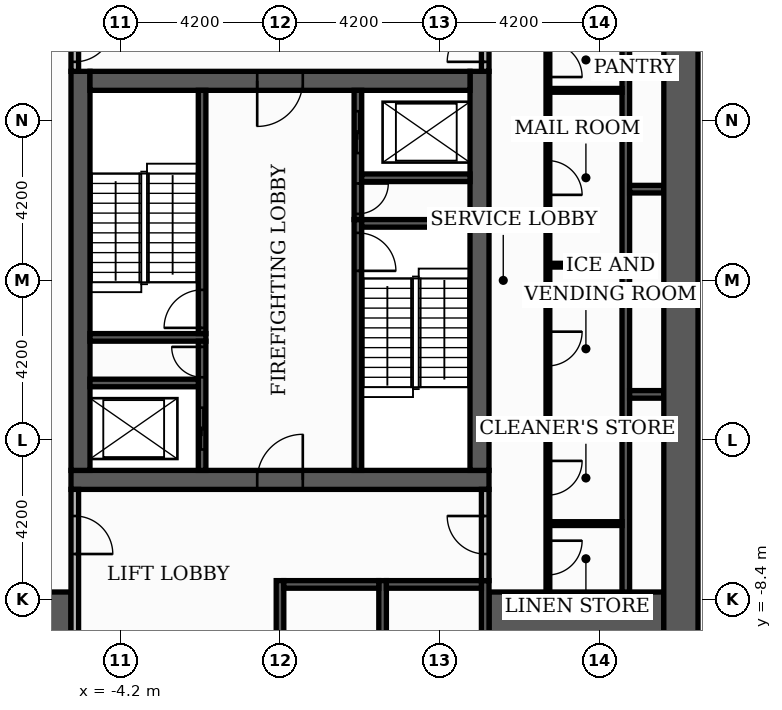
"""IFC4 building model, lengths in metres.
Left out: names, types, materials, properties, quantities, classifications, styles, units other than length and angle.
Written with IfcOpenShell. Run it as: python <this file> out.ifc"""

import sys

from ifc_helpers import new_model, si_unit, direction, frame, frame_2d, origin, place, context, subcontext, project, spatial, rectangle, extrude, element, fill, save


model = new_model("IFC4")
c1 = context("Model", 3, precision=1e-05, world=origin(), true_north=direction((0.0, 1.0)))
c2 = subcontext(c1, "Body", "Model", "MODEL_VIEW")
j1 = project(units=[si_unit("LENGTHUNIT", "METRE"), si_unit("PLANEANGLEUNIT", "RADIAN")], contexts=[c1])
p1 = place(None, origin())
s1 = spatial("IfcSite", under=j1, at=p1, CompositionType="ELEMENT")
p2 = place(p1, origin())
s2 = spatial("IfcBuilding", under=s1, at=p2, CompositionType="ELEMENT")
p3 = place(p2, frame((0.0, 0.0, -4.2)))
s3 = spatial("IfcBuildingStorey", under=s2, at=p3, CompositionType="ELEMENT", Elevation=-4.2)
p4 = place(p3, frame((-5.5, -5.25, 0.0), z_axis=(0.0, 0.0, 1.0), x_axis=(1.0, 0.0, 0.0)))
e1 = element("IfcWall", 1, at=p4, inside=s3, PredefinedType="SHEAR", context=c2, shape_type="SweptSolid", body=[
    extrude(rectangle(XDim=11.0, YDim=0.5, at=frame_2d((5.5, 0.0))), origin(), (0.0, 0.0, 1.0), 3.78),
])
p5 = place(p4, frame((4.9, 0.0, 0.0)))
e2 = element("IfcOpeningElement", 2, at=p5, cuts=e1, PredefinedType="OPENING", context=c2, shape_type="SweptSolid", body=[
    extrude(rectangle(XDim=1.2, YDim=2.1, at=frame_2d((0.6, 1.05))), frame((0.0, 0.26, 0.0), z_axis=(0.0, -1.0, 0.0), x_axis=(1.0, 0.0, 0.0)), (0.0, 0.0, 1.0), 0.52),
])
for number, where, z_axis, x_axis in (
    (3, (-5.25, -5.0, 0.0), (0.0, 0.0, 1.0), (0.0, 1.0, 0.0)),
    (4, (5.25, -5.0, 0.0), (0.0, 0.0, 1.0), (0.0, 1.0, 0.0)),
):
    element("IfcWall", number, at=place(p3, frame(where, z_axis=z_axis, x_axis=x_axis)), inside=s3, PredefinedType="SHEAR", context=c2, shape_type="SweptSolid", body=[
        extrude(rectangle(XDim=10.5, YDim=0.5, at=frame_2d((5.25, 0.0))), origin(), (0.0, 0.0, 1.0), 3.78),
    ])
p6 = place(p3, frame((-5.0, 5.25, 0.0), z_axis=(0.0, 0.0, 1.0), x_axis=(1.0, 0.0, 0.0)))
e5 = element("IfcWall", 5, at=p6, inside=s3, PredefinedType="SHEAR", context=c2, shape_type="SweptSolid", body=[
    extrude(rectangle(XDim=10.0, YDim=0.5, at=frame_2d((5.0, 0.0))), origin(), (0.0, 0.0, 1.0), 3.78),
])
p7 = place(p6, frame((4.4, 0.0, 0.0)))
e6 = element("IfcOpeningElement", 6, at=p7, cuts=e5, PredefinedType="OPENING", context=c2, shape_type="SweptSolid", body=[
    extrude(rectangle(XDim=1.2, YDim=2.1, at=frame_2d((0.6, 1.05))), frame((0.0, 0.26, 0.0), z_axis=(0.0, -1.0, 0.0), x_axis=(1.0, 0.0, 0.0)), (0.0, 0.0, 1.0), 0.52),
])
for number, where, z_axis, x_axis in (
    (7, (-10.1, -9.15, 0.0), (0.0, 0.0, 1.0), (1.0, 0.0, 0.0)),
    (8, (5.5, -9.15, 0.0), (0.0, 0.0, 1.0), (1.0, 0.0, 0.0)),
):
    element("IfcWall", number, at=place(p3, frame(where, z_axis=z_axis, x_axis=x_axis)), inside=s3, PredefinedType="SHEAR", context=c2, shape_type="SweptSolid", body=[
        extrude(rectangle(XDim=4.6, YDim=1.9, at=frame_2d((2.3, 0.0))), origin(), (0.0, 0.0, 1.0), 3.78),
    ])
p8 = place(p3, frame((2.05, -5.0, 0.0), z_axis=(0.0, 0.0, 1.0), x_axis=(0.0, 1.0, 0.0)))
e9 = element("IfcWall", 9, at=p8, inside=s3, PredefinedType="SHEAR", context=c2, shape_type="SweptSolid", body=[
    extrude(rectangle(XDim=6.6, YDim=0.2, at=frame_2d((3.3, 0.0))), origin(), (0.0, 0.0, 1.0), 3.78),
])
p9 = place(p8, frame((5.25, 0.0, 0.0)))
e10 = element("IfcOpeningElement", 10, at=p9, cuts=e9, PredefinedType="OPENING", context=c2, shape_type="SweptSolid", body=[
    extrude(rectangle(XDim=1.0, YDim=2.1, at=frame_2d((0.5, 1.05))), frame((0.0, 0.11, 0.0), z_axis=(0.0, -1.0, 0.0), x_axis=(1.0, 0.0, 0.0)), (0.0, 0.0, 1.0), 0.22),
])
p10 = place(p3, frame((-5.0, -1.5, 0.0), z_axis=(0.0, 0.0, 1.0), x_axis=(1.0, 0.0, 0.0)))
e11 = element("IfcWall", 11, at=p10, inside=s3, PredefinedType="SHEAR", context=c2, shape_type="SweptSolid", body=[
    extrude(rectangle(XDim=3.05, YDim=0.2, at=frame_2d((1.525, 0.0))), origin(), (0.0, 0.0, 1.0), 3.78),
])
p11 = place(p3, frame((-2.05, -1.4, 0.0), z_axis=(0.0, 0.0, 1.0), x_axis=(0.0, 1.0, 0.0)))
e12 = element("IfcWall", 12, at=p11, inside=s3, PredefinedType="SHEAR", context=c2, shape_type="SweptSolid", body=[
    extrude(rectangle(XDim=6.4, YDim=0.2, at=frame_2d((3.2, 0.0))), origin(), (0.0, 0.0, 1.0), 3.78),
])
p12 = place(p11, frame((0.15, 0.0, 0.0)))
e13 = element("IfcOpeningElement", 13, at=p12, cuts=e12, PredefinedType="OPENING", context=c2, shape_type="SweptSolid", body=[
    extrude(rectangle(XDim=1.0, YDim=2.1, at=frame_2d((0.5, 1.05))), frame((0.0, 0.11, 0.0), z_axis=(0.0, -1.0, 0.0), x_axis=(1.0, 0.0, 0.0)), (0.0, 0.0, 1.0), 0.22),
])
p13 = place(p3, frame((2.15, 1.5, 0.0), z_axis=(0.0, 0.0, 1.0), x_axis=(1.0, 0.0, 0.0)))
e14 = element("IfcWall", 14, at=p13, inside=s3, PredefinedType="SHEAR", context=c2, shape_type="SweptSolid", body=[
    extrude(rectangle(XDim=2.85, YDim=0.2, at=frame_2d((1.425, 0.0))), origin(), (0.0, 0.0, 1.0), 3.78),
])
for number, where, z_axis, x_axis in (
    (15, (0.0, -10.1, 0.0), (0.0, 0.0, 1.0), (0.0, 1.0, 0.0)),
    (16, (2.7, -10.1, 0.0), (0.0, 0.0, 1.0), (0.0, 1.0, 0.0)),
    (17, (5.4, -10.1, 0.0), (0.0, 0.0, 1.0), (0.0, 1.0, 0.0)),
):
    element("IfcWall", number, at=place(p3, frame(where, z_axis=z_axis, x_axis=x_axis)), inside=s3, PredefinedType="SHEAR", context=c2, shape_type="SweptSolid", body=[
        extrude(rectangle(XDim=2.2, YDim=0.2, at=frame_2d((1.1, 0.0))), origin(), (0.0, 0.0, 1.0), 3.78),
    ])
p14 = place(p3, frame((9.1, -8.2, 0.0), z_axis=(0.0, 0.0, 1.0), x_axis=(0.0, 1.0, 0.0)))
e18 = element("IfcWall", 18, at=p14, inside=s3, PredefinedType="SHEAR", context=c2, shape_type="SweptSolid", body=[
    extrude(rectangle(XDim=16.4, YDim=0.2, at=frame_2d((8.2, 0.0))), origin(), (0.0, 0.0, 1.0), 3.78),
])
for number, where, z_axis, x_axis in (
    (19, (0.1, -8.0, 0.0), (0.0, 0.0, 1.0), (1.0, 0.0, 0.0)),
    (20, (2.8, -8.0, 0.0), (0.0, 0.0, 1.0), (1.0, 0.0, 0.0)),
):
    element("IfcWall", number, at=place(p3, frame(where, z_axis=z_axis, x_axis=x_axis)), inside=s3, PredefinedType="SHEAR", context=c2, shape_type="SweptSolid", body=[
        extrude(rectangle(XDim=2.5, YDim=0.2, at=frame_2d((1.25, 0.0))), origin(), (0.0, 0.0, 1.0), 3.78),
    ])
p15 = place(p3, frame((-2.05, -5.0, 0.0), z_axis=(0.0, 0.0, 1.0), x_axis=(0.0, 1.0, 0.0)))
e21 = element("IfcWall", 21, at=p15, inside=s3, PredefinedType="SHEAR", context=c2, shape_type="SweptSolid", body=[
    extrude(rectangle(XDim=3.4, YDim=0.2, at=frame_2d((1.7, 0.0))), origin(), (0.0, 0.0, 1.0), 3.78),
])
p16 = place(p15, frame((0.55, 0.0, 0.0)))
e22 = element("IfcOpeningElement", 22, at=p16, cuts=e21, PredefinedType="OPENING", context=c2, shape_type="SweptSolid", body=[
    extrude(rectangle(XDim=1.1, YDim=2.1, at=frame_2d((0.55, 1.05))), frame((0.0, 0.11, 0.0), z_axis=(0.0, -1.0, 0.0), x_axis=(1.0, 0.0, 0.0)), (0.0, 0.0, 1.0), 0.22),
])
p17 = place(p15, frame((2.45, 0.0, 0.0)))
e23 = element("IfcOpeningElement", 23, at=p17, cuts=e21, PredefinedType="OPENING", context=c2, shape_type="SweptSolid", body=[
    extrude(rectangle(XDim=0.8, YDim=2.1, at=frame_2d((0.4, 1.05))), frame((0.0, 0.11, 0.0), z_axis=(0.0, -1.0, 0.0), x_axis=(1.0, 0.0, 0.0)), (0.0, 0.0, 1.0), 0.22),
])
p18 = place(p3, frame((9.2, -3.0, 0.0), z_axis=(0.0, 0.0, 1.0), x_axis=(1.0, 0.0, 0.0)))
e24 = element("IfcWall", 24, at=p18, inside=s3, PredefinedType="SHEAR", context=c2, shape_type="SweptSolid", body=[
    extrude(rectangle(XDim=0.9, YDim=0.2, at=frame_2d((0.45, 0.0))), origin(), (0.0, 0.0, 1.0), 3.78),
])
p19 = place(p3, frame((-5.0, -2.7, 0.0), z_axis=(0.0, 0.0, 1.0), x_axis=(1.0, 0.0, 0.0)))
e25 = element("IfcWall", 25, at=p19, inside=s3, PredefinedType="SHEAR", context=c2, shape_type="SweptSolid", body=[
    extrude(rectangle(XDim=2.85, YDim=0.2, at=frame_2d((1.425, 0.0))), origin(), (0.0, 0.0, 1.0), 3.78),
])
p20 = place(p3, frame((2.05, 1.6, 0.0), z_axis=(0.0, 0.0, 1.0), x_axis=(0.0, 1.0, 0.0)))
e26 = element("IfcWall", 26, at=p20, inside=s3, PredefinedType="SHEAR", context=c2, shape_type="SweptSolid", body=[
    extrude(rectangle(XDim=3.4, YDim=0.2, at=frame_2d((1.7, 0.0))), origin(), (0.0, 0.0, 1.0), 3.78),
])
p21 = place(p20, frame((1.75, 0.0, 0.0)))
e27 = element("IfcOpeningElement", 27, at=p21, cuts=e26, PredefinedType="OPENING", context=c2, shape_type="SweptSolid", body=[
    extrude(rectangle(XDim=1.1, YDim=2.1, at=frame_2d((0.55, 1.05))), frame((0.0, 0.11, 0.0), z_axis=(0.0, -1.0, 0.0), x_axis=(1.0, 0.0, 0.0)), (0.0, 0.0, 1.0), 0.22),
])
p22 = place(p20, frame((0.15, 0.0, 0.0)))
e28 = element("IfcOpeningElement", 28, at=p22, cuts=e26, PredefinedType="OPENING", context=c2, shape_type="SweptSolid", body=[
    extrude(rectangle(XDim=0.8, YDim=2.1, at=frame_2d((0.4, 1.05))), frame((0.0, 0.11, 0.0), z_axis=(0.0, -1.0, 0.0), x_axis=(1.0, 0.0, 0.0)), (0.0, 0.0, 1.0), 0.22),
])
p23 = place(p3, frame((9.2, 2.4, 0.0), z_axis=(0.0, 0.0, 1.0), x_axis=(1.0, 0.0, 0.0)))
e29 = element("IfcWall", 29, at=p23, inside=s3, PredefinedType="SHEAR", context=c2, shape_type="SweptSolid", body=[
    extrude(rectangle(XDim=0.9, YDim=0.2, at=frame_2d((0.45, 0.0))), origin(), (0.0, 0.0, 1.0), 3.78),
])
p24 = place(p3, frame((2.15, 2.7, 0.0), z_axis=(0.0, 0.0, 1.0), x_axis=(1.0, 0.0, 0.0)))
e30 = element("IfcWall", 30, at=p24, inside=s3, PredefinedType="SHEAR", context=c2, shape_type="SweptSolid", body=[
    extrude(rectangle(XDim=2.85, YDim=0.2, at=frame_2d((1.425, 0.0))), origin(), (0.0, 0.0, 1.0), 3.78),
])
p25 = place(p3, frame((10.55, -10.1, 0.0), z_axis=(0.0, 0.0, 1.0), x_axis=(0.0, 1.0, 0.0)))
e31 = element("IfcWall", 31, at=p25, inside=s3, PredefinedType="SHEAR", context=c2, shape_type="SweptSolid", body=[
    extrude(rectangle(XDim=20.2, YDim=0.9, at=frame_2d((10.1, 0.0))), origin(), (0.0, 0.0, 1.0), 3.78),
])
p26 = place(p3, frame((-5.4, -10.1, 0.0), z_axis=(0.0, 0.0, 1.0), x_axis=(0.0, 1.0, 0.0)))
e32 = element("IfcWall", 32, at=p26, inside=s3, PredefinedType="PARTITIONING", context=c2, shape_type="SweptSolid", body=[
    extrude(rectangle(XDim=4.6, YDim=0.2, at=frame_2d((2.3, 0.0))), origin(), (0.0, 0.0, 1.0), 3.78),
])
p27 = place(p26, frame((2.9, 0.0, 0.0)))
e33 = element("IfcOpeningElement", 33, at=p27, cuts=e32, PredefinedType="OPENING", context=c2, shape_type="SweptSolid", body=[
    extrude(rectangle(XDim=1.0, YDim=2.1, at=frame_2d((0.5, 1.05))), frame((0.0, 0.11, 0.0), z_axis=(0.0, -1.0, 0.0), x_axis=(1.0, 0.0, 0.0)), (0.0, 0.0, 1.0), 0.22),
])
p28 = place(p3, frame((7.05, -8.2, 0.0), z_axis=(0.0, 0.0, 1.0), x_axis=(0.0, 1.0, 0.0)))
e34 = element("IfcWall", 34, at=p28, inside=s3, PredefinedType="PARTITIONING", context=c2, shape_type="SweptSolid", body=[
    extrude(rectangle(XDim=16.4, YDim=0.1, at=frame_2d((8.2, 0.0))), origin(), (0.0, 0.0, 1.0), 3.78),
])
p29 = place(p28, frame((0.45, 0.0, 0.0)))
e35 = element("IfcOpeningElement", 35, at=p29, cuts=e34, PredefinedType="OPENING", context=c2, shape_type="SweptSolid", body=[
    extrude(rectangle(XDim=0.9, YDim=2.1, at=frame_2d((0.45, 1.05))), frame((0.0, 0.06, 0.0), z_axis=(0.0, -1.0, 0.0), x_axis=(1.0, 0.0, 0.0)), (0.0, 0.0, 1.0), 0.12),
])
p30 = place(p28, frame((2.55, 0.0, 0.0)))
e36 = element("IfcOpeningElement", 36, at=p30, cuts=e34, PredefinedType="OPENING", context=c2, shape_type="SweptSolid", body=[
    extrude(rectangle(XDim=0.9, YDim=2.1, at=frame_2d((0.45, 1.05))), frame((0.0, 0.06, 0.0), z_axis=(0.0, -1.0, 0.0), x_axis=(1.0, 0.0, 0.0)), (0.0, 0.0, 1.0), 0.12),
])
p31 = place(p28, frame((5.95, 0.0, 0.0)))
e37 = element("IfcOpeningElement", 37, at=p31, cuts=e34, PredefinedType="OPENING", context=c2, shape_type="SweptSolid", body=[
    extrude(rectangle(XDim=0.9, YDim=2.1, at=frame_2d((0.45, 1.05))), frame((0.0, 0.06, 0.0), z_axis=(0.0, -1.0, 0.0), x_axis=(1.0, 0.0, 0.0)), (0.0, 0.0, 1.0), 0.12),
])
p32 = place(p28, frame((10.45, 0.0, 0.0)))
e38 = element("IfcOpeningElement", 38, at=p32, cuts=e34, PredefinedType="OPENING", context=c2, shape_type="SweptSolid", body=[
    extrude(rectangle(XDim=0.9, YDim=2.1, at=frame_2d((0.45, 1.05))), frame((0.0, 0.06, 0.0), z_axis=(0.0, -1.0, 0.0), x_axis=(1.0, 0.0, 0.0)), (0.0, 0.0, 1.0), 0.12),
])
p33 = place(p28, frame((13.55, 0.0, 0.0)))
e39 = element("IfcOpeningElement", 39, at=p33, cuts=e34, PredefinedType="OPENING", context=c2, shape_type="SweptSolid", body=[
    extrude(rectangle(XDim=0.9, YDim=2.1, at=frame_2d((0.45, 1.05))), frame((0.0, 0.06, 0.0), z_axis=(0.0, -1.0, 0.0), x_axis=(1.0, 0.0, 0.0)), (0.0, 0.0, 1.0), 0.12),
])
p34 = place(p28, frame((15.1, 0.0, 0.0)))
e40 = element("IfcOpeningElement", 40, at=p34, cuts=e34, PredefinedType="OPENING", context=c2, shape_type="SweptSolid", body=[
    extrude(rectangle(XDim=1.0, YDim=2.1, at=frame_2d((0.5, 1.05))), frame((0.0, 0.06, 0.0), z_axis=(0.0, -1.0, 0.0), x_axis=(1.0, 0.0, 0.0)), (0.0, 0.0, 1.0), 0.12),
])
p35 = place(p3, frame((5.4, -7.9, 0.0), z_axis=(0.0, 0.0, 1.0), x_axis=(0.0, 1.0, 0.0)))
e41 = element("IfcWall", 41, at=p35, inside=s3, PredefinedType="PARTITIONING", context=c2, shape_type="SweptSolid", body=[
    extrude(rectangle(XDim=2.4, YDim=0.2, at=frame_2d((1.2, 0.0))), origin(), (0.0, 0.0, 1.0), 3.78),
])
p36 = place(p35, frame((0.7, 0.0, 0.0)))
e42 = element("IfcOpeningElement", 42, at=p36, cuts=e41, PredefinedType="OPENING", context=c2, shape_type="SweptSolid", body=[
    extrude(rectangle(XDim=1.0, YDim=2.1, at=frame_2d((0.5, 1.05))), frame((0.0, 0.11, 0.0), z_axis=(0.0, -1.0, 0.0), x_axis=(1.0, 0.0, 0.0)), (0.0, 0.0, 1.0), 0.22),
])
for number, where, z_axis, x_axis in (
    (43, (7.1, -6.4, 0.0), (0.0, 0.0, 1.0), (1.0, 0.0, 0.0)),
    (44, (7.1, -4.0, 0.0), (0.0, 0.0, 1.0), (1.0, 0.0, 0.0)),
    (45, (7.1, 0.4, 0.0), (0.0, 0.0, 1.0), (1.0, 0.0, 0.0)),
    (46, (7.1, 5.0, 0.0), (0.0, 0.0, 1.0), (1.0, 0.0, 0.0)),
):
    element("IfcWall", number, at=place(p3, frame(where, z_axis=z_axis, x_axis=x_axis)), inside=s3, PredefinedType="PARTITIONING", context=c2, shape_type="SweptSolid", body=[
        extrude(rectangle(XDim=1.9, YDim=0.1, at=frame_2d((0.95, 0.0))), origin(), (0.0, 0.0, 1.0), 3.78),
    ])
p37 = place(p3, frame((-5.4, 5.5, 0.0), z_axis=(0.0, 0.0, 1.0), x_axis=(0.0, 1.0, 0.0)))
e47 = element("IfcWall", 47, at=p37, inside=s3, PredefinedType="PARTITIONING", context=c2, shape_type="SweptSolid", body=[
    extrude(rectangle(XDim=1.55, YDim=0.2, at=frame_2d((0.775, 0.0))), origin(), (0.0, 0.0, 1.0), 3.78),
])
p38 = place(p37, frame((0.25, 0.0, 0.0)))
e48 = element("IfcOpeningElement", 48, at=p38, cuts=e47, PredefinedType="OPENING", context=c2, shape_type="SweptSolid", body=[
    extrude(rectangle(XDim=1.0, YDim=2.1, at=frame_2d((0.5, 1.05))), frame((0.0, 0.11, 0.0), z_axis=(0.0, -1.0, 0.0), x_axis=(1.0, 0.0, 0.0)), (0.0, 0.0, 1.0), 0.22),
])
p39 = place(p3, frame((5.4, 5.5, 0.0), z_axis=(0.0, 0.0, 1.0), x_axis=(0.0, 1.0, 0.0)))
e49 = element("IfcWall", 49, at=p39, inside=s3, PredefinedType="PARTITIONING", context=c2, shape_type="SweptSolid", body=[
    extrude(rectangle(XDim=4.6, YDim=0.2, at=frame_2d((2.3, 0.0))), origin(), (0.0, 0.0, 1.0), 3.78),
])
p40 = place(p39, frame((0.25, 0.0, 0.0)))
e50 = element("IfcOpeningElement", 50, at=p40, cuts=e49, PredefinedType="OPENING", context=c2, shape_type="SweptSolid", body=[
    extrude(rectangle(XDim=1.0, YDim=2.1, at=frame_2d((0.5, 1.05))), frame((0.0, 0.11, 0.0), z_axis=(0.0, -1.0, 0.0), x_axis=(1.0, 0.0, 0.0)), (0.0, 0.0, 1.0), 0.22),
])
p41 = place(p21, origin())
e51 = element("IfcDoor", 51, at=p41, inside=s3, OperationType="SLIDING_TO_LEFT", PredefinedType="DOOR", context=c2, shape_type="SweptSolid", body=[
    extrude(rectangle(XDim=1.1, YDim=2.1, at=frame_2d((0.55, 1.05))), frame((0.0, 0.025, 0.0), z_axis=(0.0, -1.0, 0.0), x_axis=(1.0, 0.0, 0.0)), (0.0, 0.0, 1.0), 0.05),
])
fill(e27, e51)
p42 = place(p16, origin())
e52 = element("IfcDoor", 52, at=p42, inside=s3, OperationType="SLIDING_TO_LEFT", PredefinedType="DOOR", context=c2, shape_type="SweptSolid", body=[
    extrude(rectangle(XDim=1.1, YDim=2.1, at=frame_2d((0.55, 1.05))), frame((0.0, 0.025, 0.0), z_axis=(0.0, -1.0, 0.0), x_axis=(1.0, 0.0, 0.0)), (0.0, 0.0, 1.0), 0.05),
])
fill(e22, e52)
p43 = place(p12, origin())
e53 = element("IfcDoor", 53, at=p43, inside=s3, OperationType="SINGLE_SWING_LEFT", PredefinedType="DOOR", context=c2, shape_type="SweptSolid", body=[
    extrude(rectangle(XDim=1.0, YDim=2.1, at=frame_2d((0.5, 1.05))), frame((0.0, 0.025, 0.0), z_axis=(0.0, -1.0, 0.0), x_axis=(1.0, 0.0, 0.0)), (0.0, 0.0, 1.0), 0.05),
])
fill(e13, e53)
p44 = place(p9, frame((1.0, 0.0, 0.0), z_axis=(0.0, 0.0, 1.0), x_axis=(-1.0, 0.0, 0.0)))
e54 = element("IfcDoor", 54, at=p44, inside=s3, OperationType="SINGLE_SWING_LEFT", PredefinedType="DOOR", context=c2, shape_type="SweptSolid", body=[
    extrude(rectangle(XDim=1.0, YDim=2.1, at=frame_2d((0.5, 1.05))), frame((0.0, 0.025, 0.0), z_axis=(0.0, -1.0, 0.0), x_axis=(1.0, 0.0, 0.0)), (0.0, 0.0, 1.0), 0.05),
])
fill(e10, e54)
p45 = place(p22, frame((0.8, 0.0, 0.0), z_axis=(0.0, 0.0, 1.0), x_axis=(-1.0, 0.0, 0.0)))
e55 = element("IfcDoor", 55, at=p45, inside=s3, OperationType="SINGLE_SWING_RIGHT", PredefinedType="DOOR", context=c2, shape_type="SweptSolid", body=[
    extrude(rectangle(XDim=0.8, YDim=2.1, at=frame_2d((0.4, 1.05))), frame((0.0, 0.025, 0.0), z_axis=(0.0, -1.0, 0.0), x_axis=(1.0, 0.0, 0.0)), (0.0, 0.0, 1.0), 0.05),
])
fill(e28, e55)
p46 = place(p17, origin())
e56 = element("IfcDoor", 56, at=p46, inside=s3, OperationType="SINGLE_SWING_RIGHT", PredefinedType="DOOR", context=c2, shape_type="SweptSolid", body=[
    extrude(rectangle(XDim=0.8, YDim=2.1, at=frame_2d((0.4, 1.05))), frame((0.0, 0.025, 0.0), z_axis=(0.0, -1.0, 0.0), x_axis=(1.0, 0.0, 0.0)), (0.0, 0.0, 1.0), 0.05),
])
fill(e23, e56)
p47 = place(p7, frame((1.2, 0.0, 0.0), z_axis=(0.0, 0.0, 1.0), x_axis=(-1.0, 0.0, 0.0)))
e57 = element("IfcDoor", 57, at=p47, inside=s3, OperationType="SINGLE_SWING_LEFT", PredefinedType="DOOR", context=c2, shape_type="SweptSolid", body=[
    extrude(rectangle(XDim=1.2, YDim=2.1, at=frame_2d((0.6, 1.05))), frame((0.0, 0.025, 0.0), z_axis=(0.0, -1.0, 0.0), x_axis=(1.0, 0.0, 0.0)), (0.0, 0.0, 1.0), 0.05),
])
fill(e6, e57)
p48 = place(p5, origin())
e58 = element("IfcDoor", 58, at=p48, inside=s3, OperationType="SINGLE_SWING_RIGHT", PredefinedType="DOOR", context=c2, shape_type="SweptSolid", body=[
    extrude(rectangle(XDim=1.2, YDim=2.1, at=frame_2d((0.6, 1.05))), frame((0.0, 0.025, 0.0), z_axis=(0.0, -1.0, 0.0), x_axis=(1.0, 0.0, 0.0)), (0.0, 0.0, 1.0), 0.05),
])
fill(e2, e58)
p49 = place(p38, frame((1.0, 0.0, 0.0), z_axis=(0.0, 0.0, 1.0), x_axis=(-1.0, 0.0, 0.0)))
e59 = element("IfcDoor", 59, at=p49, inside=s3, OperationType="SINGLE_SWING_RIGHT", PredefinedType="DOOR", context=c2, shape_type="SweptSolid", body=[
    extrude(rectangle(XDim=1.0, YDim=2.1, at=frame_2d((0.5, 1.05))), frame((0.0, 0.025, 0.0), z_axis=(0.0, -1.0, 0.0), x_axis=(1.0, 0.0, 0.0)), (0.0, 0.0, 1.0), 0.05),
])
fill(e48, e59)
p50 = place(p40, origin())
e60 = element("IfcDoor", 60, at=p50, inside=s3, OperationType="SINGLE_SWING_LEFT", PredefinedType="DOOR", context=c2, shape_type="SweptSolid", body=[
    extrude(rectangle(XDim=1.0, YDim=2.1, at=frame_2d((0.5, 1.05))), frame((0.0, 0.025, 0.0), z_axis=(0.0, -1.0, 0.0), x_axis=(1.0, 0.0, 0.0)), (0.0, 0.0, 1.0), 0.05),
])
fill(e50, e60)
p51 = place(p27, frame((1.0, 0.0, 0.0), z_axis=(0.0, 0.0, 1.0), x_axis=(-1.0, 0.0, 0.0)))
e61 = element("IfcDoor", 61, at=p51, inside=s3, OperationType="SINGLE_SWING_LEFT", PredefinedType="DOOR", context=c2, shape_type="SweptSolid", body=[
    extrude(rectangle(XDim=1.0, YDim=2.1, at=frame_2d((0.5, 1.05))), frame((0.0, 0.025, 0.0), z_axis=(0.0, -1.0, 0.0), x_axis=(1.0, 0.0, 0.0)), (0.0, 0.0, 1.0), 0.05),
])
fill(e33, e61)
p52 = place(p36, origin())
e62 = element("IfcDoor", 62, at=p52, inside=s3, OperationType="SINGLE_SWING_RIGHT", PredefinedType="DOOR", context=c2, shape_type="SweptSolid", body=[
    extrude(rectangle(XDim=1.0, YDim=2.1, at=frame_2d((0.5, 1.05))), frame((0.0, 0.025, 0.0), z_axis=(0.0, -1.0, 0.0), x_axis=(1.0, 0.0, 0.0)), (0.0, 0.0, 1.0), 0.05),
])
fill(e42, e62)
p53 = place(p29, frame((0.9, 0.0, 0.0), z_axis=(0.0, 0.0, 1.0), x_axis=(-1.0, 0.0, 0.0)))
e63 = element("IfcDoor", 63, at=p53, inside=s3, OperationType="SINGLE_SWING_RIGHT", PredefinedType="DOOR", context=c2, shape_type="SweptSolid", body=[
    extrude(rectangle(XDim=0.9, YDim=2.1, at=frame_2d((0.45, 1.05))), frame((0.0, 0.025, 0.0), z_axis=(0.0, -1.0, 0.0), x_axis=(1.0, 0.0, 0.0)), (0.0, 0.0, 1.0), 0.05),
])
fill(e35, e63)
p54 = place(p30, frame((0.9, 0.0, 0.0), z_axis=(0.0, 0.0, 1.0), x_axis=(-1.0, 0.0, 0.0)))
e64 = element("IfcDoor", 64, at=p54, inside=s3, OperationType="SINGLE_SWING_RIGHT", PredefinedType="DOOR", context=c2, shape_type="SweptSolid", body=[
    extrude(rectangle(XDim=0.9, YDim=2.1, at=frame_2d((0.45, 1.05))), frame((0.0, 0.025, 0.0), z_axis=(0.0, -1.0, 0.0), x_axis=(1.0, 0.0, 0.0)), (0.0, 0.0, 1.0), 0.05),
])
fill(e36, e64)
p55 = place(p31, frame((0.9, 0.0, 0.0), z_axis=(0.0, 0.0, 1.0), x_axis=(-1.0, 0.0, 0.0)))
e65 = element("IfcDoor", 65, at=p55, inside=s3, OperationType="SINGLE_SWING_RIGHT", PredefinedType="DOOR", context=c2, shape_type="SweptSolid", body=[
    extrude(rectangle(XDim=0.9, YDim=2.1, at=frame_2d((0.45, 1.05))), frame((0.0, 0.025, 0.0), z_axis=(0.0, -1.0, 0.0), x_axis=(1.0, 0.0, 0.0)), (0.0, 0.0, 1.0), 0.05),
])
fill(e37, e65)
p56 = place(p32, frame((0.9, 0.0, 0.0), z_axis=(0.0, 0.0, 1.0), x_axis=(-1.0, 0.0, 0.0)))
e66 = element("IfcDoor", 66, at=p56, inside=s3, OperationType="SINGLE_SWING_LEFT", PredefinedType="DOOR", context=c2, shape_type="SweptSolid", body=[
    extrude(rectangle(XDim=0.9, YDim=2.1, at=frame_2d((0.45, 1.05))), frame((0.0, 0.025, 0.0), z_axis=(0.0, -1.0, 0.0), x_axis=(1.0, 0.0, 0.0)), (0.0, 0.0, 1.0), 0.05),
])
fill(e38, e66)
p57 = place(p33, frame((0.9, 0.0, 0.0), z_axis=(0.0, 0.0, 1.0), x_axis=(-1.0, 0.0, 0.0)))
e67 = element("IfcDoor", 67, at=p57, inside=s3, OperationType="SINGLE_SWING_LEFT", PredefinedType="DOOR", context=c2, shape_type="SweptSolid", body=[
    extrude(rectangle(XDim=0.9, YDim=2.1, at=frame_2d((0.45, 1.05))), frame((0.0, 0.025, 0.0), z_axis=(0.0, -1.0, 0.0), x_axis=(1.0, 0.0, 0.0)), (0.0, 0.0, 1.0), 0.05),
])
fill(e39, e67)
save(model, sys.argv[1])
